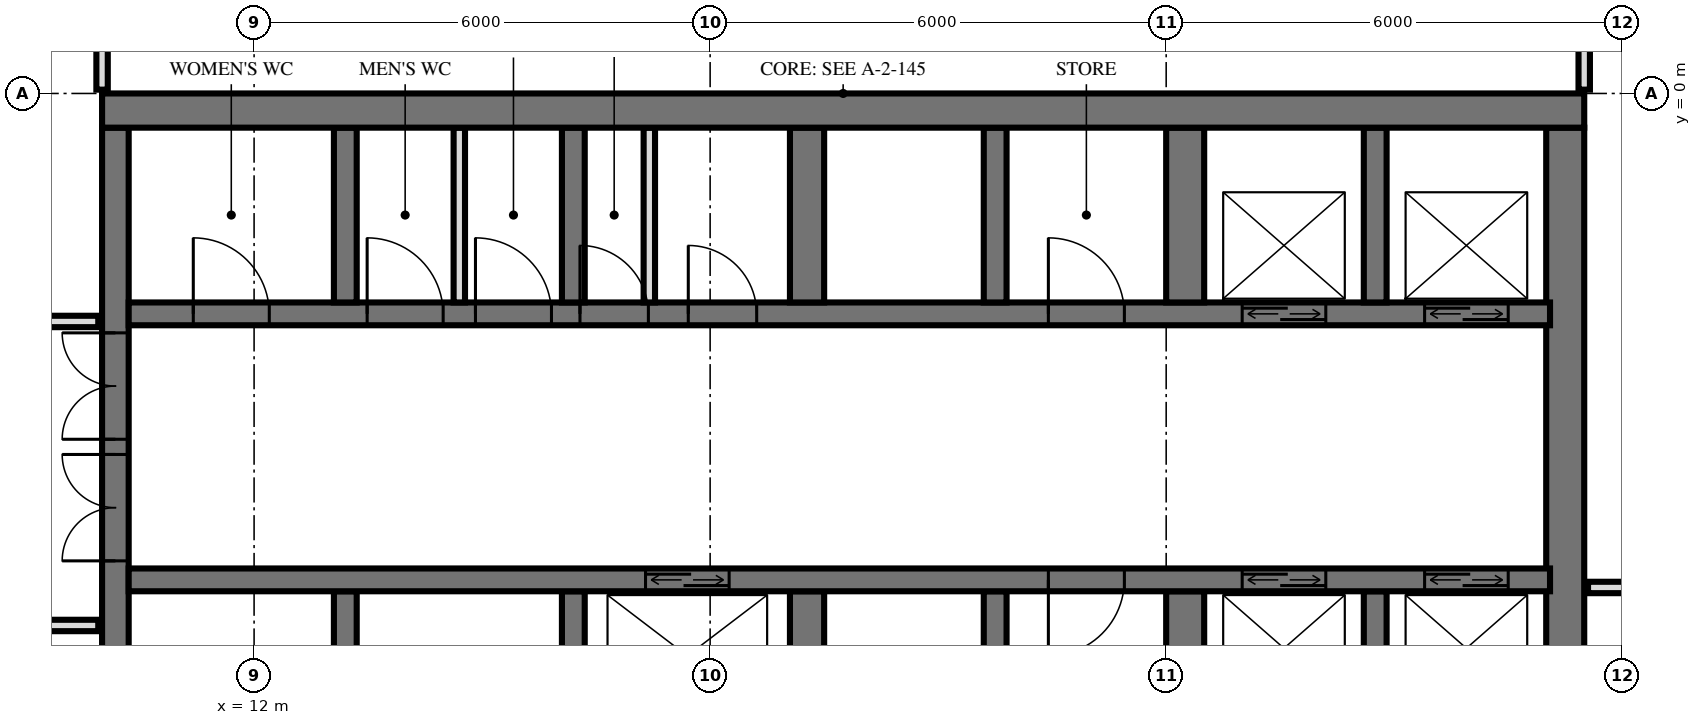
"""IFC4 building model, lengths in metres.
Left out: names, types, materials, properties, quantities, classifications, styles, units other than length and angle.
Written with IfcOpenShell. Run it as: python <this file> out.ifc"""

import sys

from ifc_helpers import new_model, si_unit, direction, frame, frame_2d, origin, place, context, subcontext, project, spatial, rectangle, extrude, element, fill, save


model = new_model("IFC4")
c1 = context("Model", 3, precision=1e-05, world=origin(), true_north=direction((0.0, 1.0)))
c2 = subcontext(c1, "Body", "Model", "MODEL_VIEW")
j1 = project(units=[si_unit("LENGTHUNIT", "METRE"), si_unit("PLANEANGLEUNIT", "RADIAN")], contexts=[c1])
p1 = place(None, origin())
s1 = spatial("IfcSite", under=j1, at=p1, CompositionType="ELEMENT")
p2 = place(p1, origin())
s2 = spatial("IfcBuilding", under=s1, at=p2, CompositionType="ELEMENT")
p3 = place(p2, frame((0.0, 0.0, 74.4)))
s3 = spatial("IfcBuildingStorey", under=s2, at=p3, CompositionType="ELEMENT", Elevation=74.4)
p4 = place(p3, frame((10.0, -0.225, 0.0), z_axis=(0.0, 0.0, 1.0), x_axis=(1.0, 0.0, 0.0)))
e1 = element("IfcWall", 1, at=p4, inside=s3, PredefinedType="SHEAR", context=c2, shape_type="SweptSolid", body=[
    extrude(rectangle(XDim=19.5, YDim=0.45, at=frame_2d((9.75, 0.0))), origin(), (0.0, 0.0, 1.0), 3.6),
])
p5 = place(p3, frame((10.175, -14.55, 0.0), z_axis=(0.0, 0.0, 1.0), x_axis=(0.0, 1.0, 0.0)))
e2 = element("IfcWall", 2, at=p5, inside=s3, PredefinedType="SHEAR", context=c2, shape_type="SweptSolid", body=[
    extrude(rectangle(XDim=14.1, YDim=0.35, at=frame_2d((7.05, 0.0))), origin(), (0.0, 0.0, 1.0), 3.6),
])
p6 = place(p5, frame((8.4, 0.0, 0.0)))
e3 = element("IfcOpeningElement", 3, at=p6, cuts=e2, PredefinedType="OPENING", context=c2, shape_type="SweptSolid", body=[
    extrude(rectangle(XDim=1.4, YDim=2.4, at=frame_2d((0.7, 1.2))), frame((0.0, 0.185, 0.0), z_axis=(0.0, -1.0, 0.0), x_axis=(1.0, 0.0, 0.0)), (0.0, 0.0, 1.0), 0.37),
])
p7 = place(p5, frame((10.0, 0.0, 0.0)))
e4 = element("IfcOpeningElement", 4, at=p7, cuts=e2, PredefinedType="OPENING", context=c2, shape_type="SweptSolid", body=[
    extrude(rectangle(XDim=1.4, YDim=2.4, at=frame_2d((0.7, 1.2))), frame((0.0, 0.185, 0.0), z_axis=(0.0, -1.0, 0.0), x_axis=(1.0, 0.0, 0.0)), (0.0, 0.0, 1.0), 0.37),
])
p8 = place(p5, frame((4.0, 0.0, 0.0)))
e5 = element("IfcOpeningElement", 5, at=p8, cuts=e2, PredefinedType="OPENING", context=c2, shape_type="SweptSolid", body=[
    extrude(rectangle(XDim=1.2, YDim=2.1, at=frame_2d((0.6, 1.05))), frame((0.0, 0.185, 0.0), z_axis=(0.0, -1.0, 0.0), x_axis=(1.0, 0.0, 0.0)), (0.0, 0.0, 1.0), 0.37),
])
p9 = place(p3, frame((29.25, -14.55, 0.0), z_axis=(0.0, 0.0, 1.0), x_axis=(0.0, 1.0, 0.0)))
e6 = element("IfcWall", 6, at=p9, inside=s3, PredefinedType="SHEAR", context=c2, shape_type="SweptSolid", body=[
    extrude(rectangle(XDim=14.1, YDim=0.5, at=frame_2d((7.05, 0.0))), origin(), (0.0, 0.0, 1.0), 3.6),
])
p10 = place(p3, frame((10.35, -2.9, 0.0), z_axis=(0.0, 0.0, 1.0), x_axis=(1.0, 0.0, 0.0)))
e7 = element("IfcWall", 7, at=p10, inside=s3, PredefinedType="SHEAR", context=c2, shape_type="SweptSolid", body=[
    extrude(rectangle(XDim=18.7, YDim=0.3, at=frame_2d((9.35, 0.0))), origin(), (0.0, 0.0, 1.0), 3.6),
])
p11 = place(p10, frame((14.65, 0.0, 0.0)))
e8 = element("IfcOpeningElement", 8, at=p11, cuts=e7, PredefinedType="OPENING", context=c2, shape_type="SweptSolid", body=[
    extrude(rectangle(XDim=1.1, YDim=2.1, at=frame_2d((0.55, 1.05))), frame((0.0, 0.16, 0.0), z_axis=(0.0, -1.0, 0.0), x_axis=(1.0, 0.0, 0.0)), (0.0, 0.0, 1.0), 0.32),
])
p12 = place(p10, frame((17.05, 0.0, 0.0)))
e9 = element("IfcOpeningElement", 9, at=p12, cuts=e7, PredefinedType="OPENING", context=c2, shape_type="SweptSolid", body=[
    extrude(rectangle(XDim=1.1, YDim=2.1, at=frame_2d((0.55, 1.05))), frame((0.0, 0.16, 0.0), z_axis=(0.0, -1.0, 0.0), x_axis=(1.0, 0.0, 0.0)), (0.0, 0.0, 1.0), 0.32),
])
p13 = place(p10, frame((5.938, 0.0, 0.0)))
e10 = element("IfcOpeningElement", 10, at=p13, cuts=e7, PredefinedType="OPENING", context=c2, shape_type="SweptSolid", body=[
    extrude(rectangle(XDim=0.9, YDim=2.1, at=frame_2d((0.45, 1.05))), frame((0.0, 0.16, 0.0), z_axis=(0.0, -1.0, 0.0), x_axis=(1.0, 0.0, 0.0)), (0.0, 0.0, 1.0), 0.32),
])
p14 = place(p10, frame((7.363, 0.0, 0.0)))
e11 = element("IfcOpeningElement", 11, at=p14, cuts=e7, PredefinedType="OPENING", context=c2, shape_type="SweptSolid", body=[
    extrude(rectangle(XDim=0.9, YDim=2.1, at=frame_2d((0.45, 1.05))), frame((0.0, 0.16, 0.0), z_axis=(0.0, -1.0, 0.0), x_axis=(1.0, 0.0, 0.0)), (0.0, 0.0, 1.0), 0.32),
])
p15 = place(p10, frame((0.85, 0.0, 0.0)))
e12 = element("IfcOpeningElement", 12, at=p15, cuts=e7, PredefinedType="OPENING", context=c2, shape_type="SweptSolid", body=[
    extrude(rectangle(XDim=1.0, YDim=2.1, at=frame_2d((0.5, 1.05))), frame((0.0, 0.16, 0.0), z_axis=(0.0, -1.0, 0.0), x_axis=(1.0, 0.0, 0.0)), (0.0, 0.0, 1.0), 0.32),
])
p16 = place(p10, frame((3.137, 0.0, 0.0)))
e13 = element("IfcOpeningElement", 13, at=p16, cuts=e7, PredefinedType="OPENING", context=c2, shape_type="SweptSolid", body=[
    extrude(rectangle(XDim=1.0, YDim=2.1, at=frame_2d((0.5, 1.05))), frame((0.0, 0.16, 0.0), z_axis=(0.0, -1.0, 0.0), x_axis=(1.0, 0.0, 0.0)), (0.0, 0.0, 1.0), 0.32),
])
p17 = place(p10, frame((4.562, 0.0, 0.0)))
e14 = element("IfcOpeningElement", 14, at=p17, cuts=e7, PredefinedType="OPENING", context=c2, shape_type="SweptSolid", body=[
    extrude(rectangle(XDim=1.0, YDim=2.1, at=frame_2d((0.5, 1.05))), frame((0.0, 0.16, 0.0), z_axis=(0.0, -1.0, 0.0), x_axis=(1.0, 0.0, 0.0)), (0.0, 0.0, 1.0), 0.32),
])
p18 = place(p10, frame((12.1, 0.0, 0.0)))
e15 = element("IfcOpeningElement", 15, at=p18, cuts=e7, PredefinedType="OPENING", context=c2, shape_type="SweptSolid", body=[
    extrude(rectangle(XDim=1.0, YDim=2.1, at=frame_2d((0.5, 1.05))), frame((0.0, 0.16, 0.0), z_axis=(0.0, -1.0, 0.0), x_axis=(1.0, 0.0, 0.0)), (0.0, 0.0, 1.0), 0.32),
])
p19 = place(p3, frame((10.35, -6.4, 0.0), z_axis=(0.0, 0.0, 1.0), x_axis=(1.0, 0.0, 0.0)))
e16 = element("IfcWall", 16, at=p19, inside=s3, PredefinedType="SHEAR", context=c2, shape_type="SweptSolid", body=[
    extrude(rectangle(XDim=18.7, YDim=0.3, at=frame_2d((9.35, 0.0))), origin(), (0.0, 0.0, 1.0), 3.6),
])
p20 = place(p19, frame((14.65, 0.0, 0.0)))
e17 = element("IfcOpeningElement", 17, at=p20, cuts=e16, PredefinedType="OPENING", context=c2, shape_type="SweptSolid", body=[
    extrude(rectangle(XDim=1.1, YDim=2.1, at=frame_2d((0.55, 1.05))), frame((0.0, 0.16, 0.0), z_axis=(0.0, -1.0, 0.0), x_axis=(1.0, 0.0, 0.0)), (0.0, 0.0, 1.0), 0.32),
])
p21 = place(p19, frame((17.05, 0.0, 0.0)))
e18 = element("IfcOpeningElement", 18, at=p21, cuts=e16, PredefinedType="OPENING", context=c2, shape_type="SweptSolid", body=[
    extrude(rectangle(XDim=1.1, YDim=2.1, at=frame_2d((0.55, 1.05))), frame((0.0, 0.16, 0.0), z_axis=(0.0, -1.0, 0.0), x_axis=(1.0, 0.0, 0.0)), (0.0, 0.0, 1.0), 0.32),
])
p22 = place(p19, frame((6.8, 0.0, 0.0)))
e19 = element("IfcOpeningElement", 19, at=p22, cuts=e16, PredefinedType="OPENING", context=c2, shape_type="SweptSolid", body=[
    extrude(rectangle(XDim=1.1, YDim=2.1, at=frame_2d((0.55, 1.05))), frame((0.0, 0.16, 0.0), z_axis=(0.0, -1.0, 0.0), x_axis=(1.0, 0.0, 0.0)), (0.0, 0.0, 1.0), 0.32),
])
p23 = place(p19, frame((12.1, 0.0, 0.0)))
e20 = element("IfcOpeningElement", 20, at=p23, cuts=e16, PredefinedType="OPENING", context=c2, shape_type="SweptSolid", body=[
    extrude(rectangle(XDim=1.0, YDim=2.1, at=frame_2d((0.5, 1.05))), frame((0.0, 0.16, 0.0), z_axis=(0.0, -1.0, 0.0), x_axis=(1.0, 0.0, 0.0)), (0.0, 0.0, 1.0), 0.32),
])
for number, where, z_axis, x_axis in (
    (21, (13.2, -2.75, 0.0), (0.0, 0.0, 1.0), (0.0, 1.0, 0.0)),
    (22, (13.2, -8.85, 0.0), (0.0, 0.0, 1.0), (0.0, 1.0, 0.0)),
    (23, (16.2, -2.75, 0.0), (0.0, 0.0, 1.0), (0.0, 1.0, 0.0)),
    (24, (16.2, -8.85, 0.0), (0.0, 0.0, 1.0), (0.0, 1.0, 0.0)),
):
    element("IfcWall", number, at=place(p3, frame(where, z_axis=z_axis, x_axis=x_axis)), inside=s3, PredefinedType="SHEAR", context=c2, shape_type="SweptSolid", body=[
        extrude(rectangle(XDim=2.3, YDim=0.3, at=frame_2d((1.15, 0.0))), origin(), (0.0, 0.0, 1.0), 3.6),
    ])
for number, where, z_axis, x_axis in (
    (25, (19.275, -2.75, 0.0), (0.0, 0.0, 1.0), (0.0, 1.0, 0.0)),
    (26, (19.275, -8.85, 0.0), (0.0, 0.0, 1.0), (0.0, 1.0, 0.0)),
):
    element("IfcWall", number, at=place(p3, frame(where, z_axis=z_axis, x_axis=x_axis)), inside=s3, PredefinedType="SHEAR", context=c2, shape_type="SweptSolid", body=[
        extrude(rectangle(XDim=2.3, YDim=0.45, at=frame_2d((1.15, 0.0))), origin(), (0.0, 0.0, 1.0), 3.6),
    ])
for number, where, z_axis, x_axis in (
    (27, (21.75, -2.75, 0.0), (0.0, 0.0, 1.0), (0.0, 1.0, 0.0)),
    (28, (21.75, -8.85, 0.0), (0.0, 0.0, 1.0), (0.0, 1.0, 0.0)),
):
    element("IfcWall", number, at=place(p3, frame(where, z_axis=z_axis, x_axis=x_axis)), inside=s3, PredefinedType="SHEAR", context=c2, shape_type="SweptSolid", body=[
        extrude(rectangle(XDim=2.3, YDim=0.3, at=frame_2d((1.15, 0.0))), origin(), (0.0, 0.0, 1.0), 3.6),
    ])
for number, where, z_axis, x_axis in (
    (29, (24.25, -2.75, 0.0), (0.0, 0.0, 1.0), (0.0, 1.0, 0.0)),
    (30, (24.25, -8.85, 0.0), (0.0, 0.0, 1.0), (0.0, 1.0, 0.0)),
):
    element("IfcWall", number, at=place(p3, frame(where, z_axis=z_axis, x_axis=x_axis)), inside=s3, PredefinedType="SHEAR", context=c2, shape_type="SweptSolid", body=[
        extrude(rectangle(XDim=2.3, YDim=0.5, at=frame_2d((1.15, 0.0))), origin(), (0.0, 0.0, 1.0), 3.6),
    ])
for number, where, z_axis, x_axis in (
    (31, (26.75, -2.75, 0.0), (0.0, 0.0, 1.0), (0.0, 1.0, 0.0)),
    (32, (26.75, -8.85, 0.0), (0.0, 0.0, 1.0), (0.0, 1.0, 0.0)),
):
    element("IfcWall", number, at=place(p3, frame(where, z_axis=z_axis, x_axis=x_axis)), inside=s3, PredefinedType="SHEAR", context=c2, shape_type="SweptSolid", body=[
        extrude(rectangle(XDim=2.3, YDim=0.3, at=frame_2d((1.15, 0.0))), origin(), (0.0, 0.0, 1.0), 3.6),
    ])
for number, where, z_axis, x_axis in (
    (33, (17.2, -2.75, 0.0), (0.0, 0.0, 1.0), (0.0, 1.0, 0.0)),
    (34, (14.7, -2.75, 0.0), (0.0, 0.0, 1.0), (0.0, 1.0, 0.0)),
):
    element("IfcWall", number, at=place(p3, frame(where, z_axis=z_axis, x_axis=x_axis)), inside=s3, PredefinedType="PARTITIONING", context=c2, shape_type="SweptSolid", body=[
        extrude(rectangle(XDim=2.3, YDim=0.15, at=frame_2d((1.15, 0.0))), origin(), (0.0, 0.0, 1.0), 3.3),
    ])
p24 = place(p3, frame((29.5, 0.05, 0.0), z_axis=(0.0, 0.0, 1.0), x_axis=(0.0, 1.0, 0.0)))
e35 = element("IfcWall", 35, at=p24, inside=s3, PredefinedType="PARTITIONING", context=c2, shape_type="SweptSolid", body=[
    extrude(rectangle(XDim=0.827, YDim=0.15, at=frame_2d((0.414, 0.0))), origin(), (0.0, 0.0, 1.0), 3.32),
])
p25 = place(p3, frame((10.0, 0.05, 0.0), z_axis=(0.0, 0.0, 1.0), x_axis=(0.0, 1.0, 0.0)))
e36 = element("IfcWall", 36, at=p25, inside=s3, PredefinedType="PARTITIONING", context=c2, shape_type="SweptSolid", body=[
    extrude(rectangle(XDim=0.97, YDim=0.15, at=frame_2d((0.485, 0.0))), origin(), (0.0, 0.0, 1.0), 3.32),
])
p26 = place(p3, frame((-9.95, -7.0, 0.0), z_axis=(0.0, 0.0, 1.0), x_axis=(1.0, 0.0, 0.0)))
e37 = element("IfcWall", 37, at=p26, inside=s3, PredefinedType="PARTITIONING", context=c2, shape_type="SweptSolid", body=[
    extrude(rectangle(XDim=19.9, YDim=0.15, at=frame_2d((9.95, 0.0))), origin(), (0.0, 0.0, 1.0), 3.32),
])
p27 = place(p26, frame((9.45, 0.0, 0.0)))
e38 = element("IfcOpeningElement", 38, at=p27, cuts=e37, PredefinedType="OPENING", context=c2, shape_type="SweptSolid", body=[
    extrude(rectangle(XDim=1.0, YDim=2.1, at=frame_2d((0.5, 1.05))), frame((0.0, 0.085, 0.0), z_axis=(0.0, -1.0, 0.0), x_axis=(1.0, 0.0, 0.0)), (0.0, 0.0, 1.0), 0.17),
])
p28 = place(p26, frame((3.45, 0.0, 0.0)))
e39 = element("IfcOpeningElement", 39, at=p28, cuts=e37, PredefinedType="OPENING", context=c2, shape_type="SweptSolid", body=[
    extrude(rectangle(XDim=1.0, YDim=2.1, at=frame_2d((0.5, 1.05))), frame((0.0, 0.085, 0.0), z_axis=(0.0, -1.0, 0.0), x_axis=(1.0, 0.0, 0.0)), (0.0, 0.0, 1.0), 0.17),
])
p29 = place(p3, frame((29.55, -6.5, 0.0), z_axis=(0.0, 0.0, 1.0), x_axis=(1.0, 0.0, 0.0)))
e40 = element("IfcWall", 40, at=p29, inside=s3, PredefinedType="PARTITIONING", context=c2, shape_type="SweptSolid", body=[
    extrude(rectangle(XDim=3.57, YDim=0.15, at=frame_2d((1.785, 0.0))), origin(), (0.0, 0.0, 1.0), 3.32),
])
p30 = place(p29, frame((1.4, 0.0, 0.0)))
e41 = element("IfcOpeningElement", 41, at=p30, cuts=e40, PredefinedType="OPENING", context=c2, shape_type="SweptSolid", body=[
    extrude(rectangle(XDim=0.9, YDim=2.1, at=frame_2d((0.45, 1.05))), frame((0.0, 0.085, 0.0), z_axis=(0.0, -1.0, 0.0), x_axis=(1.0, 0.0, 0.0)), (0.0, 0.0, 1.0), 0.17),
])
p31 = place(p3, frame((-9.95, -3.0, 0.0), z_axis=(0.0, 0.0, 1.0), x_axis=(1.0, 0.0, 0.0)))
e42 = element("IfcWall", 42, at=p31, inside=s3, PredefinedType="PARTITIONING", context=c2, shape_type="SweptSolid", body=[
    extrude(rectangle(XDim=19.9, YDim=0.15, at=frame_2d((9.95, 0.0))), origin(), (0.0, 0.0, 1.0), 3.32),
])
p32 = place(p31, frame((1.45, 0.0, 0.0)))
e43 = element("IfcOpeningElement", 43, at=p32, cuts=e42, PredefinedType="OPENING", context=c2, shape_type="SweptSolid", body=[
    extrude(rectangle(XDim=1.0, YDim=2.1, at=frame_2d((0.5, 1.05))), frame((0.0, 0.085, 0.0), z_axis=(0.0, -1.0, 0.0), x_axis=(1.0, 0.0, 0.0)), (0.0, 0.0, 1.0), 0.17),
])
p33 = place(p31, frame((4.95, 0.0, 0.0)))
e44 = element("IfcOpeningElement", 44, at=p33, cuts=e42, PredefinedType="OPENING", context=c2, shape_type="SweptSolid", body=[
    extrude(rectangle(XDim=1.0, YDim=2.1, at=frame_2d((0.5, 1.05))), frame((0.0, 0.085, 0.0), z_axis=(0.0, -1.0, 0.0), x_axis=(1.0, 0.0, 0.0)), (0.0, 0.0, 1.0), 0.17),
])
p34 = place(p31, frame((7.7, 0.0, 0.0)))
e45 = element("IfcOpeningElement", 45, at=p34, cuts=e42, PredefinedType="OPENING", context=c2, shape_type="SweptSolid", body=[
    extrude(rectangle(XDim=1.0, YDim=2.1, at=frame_2d((0.5, 1.05))), frame((0.0, 0.085, 0.0), z_axis=(0.0, -1.0, 0.0), x_axis=(1.0, 0.0, 0.0)), (0.0, 0.0, 1.0), 0.17),
])
p35 = place(p31, frame((14.2, 0.0, 0.0)))
e46 = element("IfcOpeningElement", 46, at=p35, cuts=e42, PredefinedType="OPENING", context=c2, shape_type="SweptSolid", body=[
    extrude(rectangle(XDim=1.0, YDim=2.1, at=frame_2d((0.5, 1.05))), frame((0.0, 0.085, 0.0), z_axis=(0.0, -1.0, 0.0), x_axis=(1.0, 0.0, 0.0)), (0.0, 0.0, 1.0), 0.17),
])
p36 = place(p11, origin())
e47 = element("IfcDoor", 47, at=p36, inside=s3, OperationType="DOUBLE_DOOR_SLIDING", PredefinedType="USERDEFINED", context=c2, shape_type="SweptSolid", body=[
    extrude(rectangle(XDim=1.1, YDim=2.1, at=frame_2d((0.55, 1.05))), frame((0.0, 0.025, 0.0), z_axis=(0.0, -1.0, 0.0), x_axis=(1.0, 0.0, 0.0)), (0.0, 0.0, 1.0), 0.05),
])
fill(e8, e47)
p37 = place(p12, origin())
e48 = element("IfcDoor", 48, at=p37, inside=s3, OperationType="DOUBLE_DOOR_SLIDING", PredefinedType="USERDEFINED", context=c2, shape_type="SweptSolid", body=[
    extrude(rectangle(XDim=1.1, YDim=2.1, at=frame_2d((0.55, 1.05))), frame((0.0, 0.025, 0.0), z_axis=(0.0, -1.0, 0.0), x_axis=(1.0, 0.0, 0.0)), (0.0, 0.0, 1.0), 0.05),
])
fill(e9, e48)
p38 = place(p20, origin())
e49 = element("IfcDoor", 49, at=p38, inside=s3, OperationType="DOUBLE_DOOR_SLIDING", PredefinedType="USERDEFINED", context=c2, shape_type="SweptSolid", body=[
    extrude(rectangle(XDim=1.1, YDim=2.1, at=frame_2d((0.55, 1.05))), frame((0.0, 0.025, 0.0), z_axis=(0.0, -1.0, 0.0), x_axis=(1.0, 0.0, 0.0)), (0.0, 0.0, 1.0), 0.05),
])
fill(e17, e49)
p39 = place(p21, origin())
e50 = element("IfcDoor", 50, at=p39, inside=s3, OperationType="DOUBLE_DOOR_SLIDING", PredefinedType="USERDEFINED", context=c2, shape_type="SweptSolid", body=[
    extrude(rectangle(XDim=1.1, YDim=2.1, at=frame_2d((0.55, 1.05))), frame((0.0, 0.025, 0.0), z_axis=(0.0, -1.0, 0.0), x_axis=(1.0, 0.0, 0.0)), (0.0, 0.0, 1.0), 0.05),
])
fill(e18, e50)
p40 = place(p22, origin())
e51 = element("IfcDoor", 51, at=p40, inside=s3, OperationType="DOUBLE_DOOR_SLIDING", PredefinedType="USERDEFINED", context=c2, shape_type="SweptSolid", body=[
    extrude(rectangle(XDim=1.1, YDim=2.1, at=frame_2d((0.55, 1.05))), frame((0.0, 0.025, 0.0), z_axis=(0.0, -1.0, 0.0), x_axis=(1.0, 0.0, 0.0)), (0.0, 0.0, 1.0), 0.05),
])
fill(e19, e51)
p41 = place(p6, origin())
e52 = element("IfcDoor", 52, at=p41, inside=s3, OperationType="DOUBLE_DOOR_SINGLE_SWING", PredefinedType="DOOR", context=c2, shape_type="SweptSolid", body=[
    extrude(rectangle(XDim=1.4, YDim=2.4, at=frame_2d((0.7, 1.2))), frame((0.0, 0.025, 0.0), z_axis=(0.0, -1.0, 0.0), x_axis=(1.0, 0.0, 0.0)), (0.0, 0.0, 1.0), 0.05),
])
fill(e3, e52)
p42 = place(p7, origin())
e53 = element("IfcDoor", 53, at=p42, inside=s3, OperationType="DOUBLE_DOOR_SINGLE_SWING", PredefinedType="DOOR", context=c2, shape_type="SweptSolid", body=[
    extrude(rectangle(XDim=1.4, YDim=2.4, at=frame_2d((0.7, 1.2))), frame((0.0, 0.025, 0.0), z_axis=(0.0, -1.0, 0.0), x_axis=(1.0, 0.0, 0.0)), (0.0, 0.0, 1.0), 0.05),
])
fill(e4, e53)
p43 = place(p13, origin())
e54 = element("IfcDoor", 54, at=p43, inside=s3, OperationType="SINGLE_SWING_RIGHT", PredefinedType="DOOR", context=c2, shape_type="SweptSolid", body=[
    extrude(rectangle(XDim=0.9, YDim=2.1, at=frame_2d((0.45, 1.05))), frame((0.0, 0.025, 0.0), z_axis=(0.0, -1.0, 0.0), x_axis=(1.0, 0.0, 0.0)), (0.0, 0.0, 1.0), 0.05),
])
fill(e10, e54)
p44 = place(p14, origin())
e55 = element("IfcDoor", 55, at=p44, inside=s3, OperationType="SINGLE_SWING_RIGHT", PredefinedType="DOOR", context=c2, shape_type="SweptSolid", body=[
    extrude(rectangle(XDim=0.9, YDim=2.1, at=frame_2d((0.45, 1.05))), frame((0.0, 0.025, 0.0), z_axis=(0.0, -1.0, 0.0), x_axis=(1.0, 0.0, 0.0)), (0.0, 0.0, 1.0), 0.05),
])
fill(e11, e55)
p45 = place(p15, origin())
e56 = element("IfcDoor", 56, at=p45, inside=s3, OperationType="SINGLE_SWING_RIGHT", PredefinedType="DOOR", context=c2, shape_type="SweptSolid", body=[
    extrude(rectangle(XDim=1.0, YDim=2.1, at=frame_2d((0.5, 1.05))), frame((0.0, 0.025, 0.0), z_axis=(0.0, -1.0, 0.0), x_axis=(1.0, 0.0, 0.0)), (0.0, 0.0, 1.0), 0.05),
])
fill(e12, e56)
p46 = place(p16, origin())
e57 = element("IfcDoor", 57, at=p46, inside=s3, OperationType="SINGLE_SWING_RIGHT", PredefinedType="DOOR", context=c2, shape_type="SweptSolid", body=[
    extrude(rectangle(XDim=1.0, YDim=2.1, at=frame_2d((0.5, 1.05))), frame((0.0, 0.025, 0.0), z_axis=(0.0, -1.0, 0.0), x_axis=(1.0, 0.0, 0.0)), (0.0, 0.0, 1.0), 0.05),
])
fill(e13, e57)
p47 = place(p17, origin())
e58 = element("IfcDoor", 58, at=p47, inside=s3, OperationType="SINGLE_SWING_RIGHT", PredefinedType="DOOR", context=c2, shape_type="SweptSolid", body=[
    extrude(rectangle(XDim=1.0, YDim=2.1, at=frame_2d((0.5, 1.05))), frame((0.0, 0.025, 0.0), z_axis=(0.0, -1.0, 0.0), x_axis=(1.0, 0.0, 0.0)), (0.0, 0.0, 1.0), 0.05),
])
fill(e14, e58)
p48 = place(p18, origin())
e59 = element("IfcDoor", 59, at=p48, inside=s3, OperationType="SINGLE_SWING_RIGHT", PredefinedType="DOOR", context=c2, shape_type="SweptSolid", body=[
    extrude(rectangle(XDim=1.0, YDim=2.1, at=frame_2d((0.5, 1.05))), frame((0.0, 0.025, 0.0), z_axis=(0.0, -1.0, 0.0), x_axis=(1.0, 0.0, 0.0)), (0.0, 0.0, 1.0), 0.05),
])
fill(e15, e59)
p49 = place(p23, frame((0.5, 0.0, 0.0), z_axis=(0.0, 0.0, 1.0), x_axis=(-1.0, 0.0, 0.0)))
e60 = element("IfcDoor", 60, at=p49, inside=s3, OperationType="SINGLE_SWING_LEFT", PredefinedType="DOOR", context=c2, shape_type="SweptSolid", body=[
    extrude(rectangle(XDim=1.0, YDim=2.1, at=frame_2d((0.0, 1.05))), frame((0.0, -0.025, 0.0), z_axis=(0.0, 1.0, 0.0), x_axis=(-1.0, 0.0, 0.0)), (0.0, 0.0, 1.0), 0.05),
])
fill(e20, e60)
save(model, sys.argv[1])
